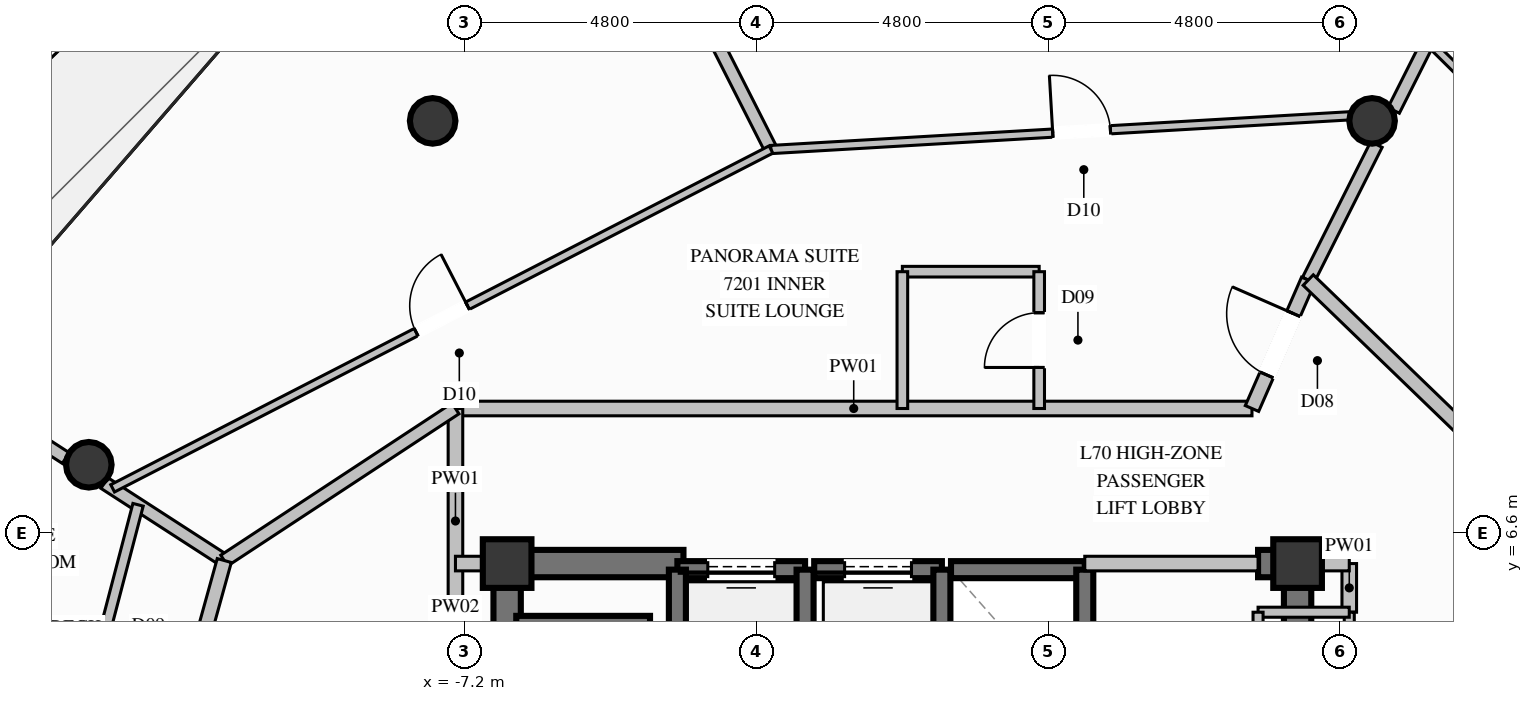
"""IFC4 building model, lengths in metres.
Left out: names, types, materials, properties, quantities, classifications, styles, units other than length and angle.
Written with IfcOpenShell. Run it as: python <this file> out.ifc"""

import sys

from ifc_helpers import new_model, si_unit, direction, frame, frame_2d, origin, origin_2d, place, context, subcontext, project, spatial, rectangle, circle, extrude, element, fill, save


model = new_model("IFC4")
c1 = context("Model", 3, precision=1e-05, world=origin(), true_north=direction((0.0, 1.0)))
c2 = subcontext(c1, "Body", "Model", "MODEL_VIEW")
j1 = project(units=[si_unit("LENGTHUNIT", "METRE"), si_unit("PLANEANGLEUNIT", "RADIAN")], contexts=[c1])
p1 = place(None, origin())
s1 = spatial("IfcSite", under=j1, at=p1, CompositionType="ELEMENT")
p2 = place(p1, origin())
s2 = spatial("IfcBuilding", under=s1, at=p2, CompositionType="ELEMENT")
p3 = place(p2, frame((0.0, 0.0, 270.6)))
s3 = spatial("IfcBuildingStorey", under=s2, at=p3, CompositionType="ELEMENT", Elevation=270.6)
for number, where, z_axis, x_axis in (
    (1, (6.5, 6.1, 0.0), (0.0, 0.0, 1.0), (1.0, 0.0, 0.0)),
    (2, (-6.5, 6.1, 0.0), (0.0, 0.0, 1.0), (1.0, 0.0, 0.0)),
):
    element("IfcColumn", number, at=place(p3, frame(where, z_axis=z_axis, x_axis=x_axis)), inside=s3, PredefinedType="COLUMN", context=c2, shape_type="SweptSolid", body=[
        extrude(rectangle(XDim=0.8, YDim=0.8, at=origin_2d()), origin(), (0.0, 0.0, 1.0), 3.8),
    ])
p4 = place(p3, frame((-6.275, 6.1, 0.0), z_axis=(0.0, 0.0, 1.0), x_axis=(1.0, 0.0, 0.0)))
e3 = element("IfcWall", 3, at=p4, inside=s3, PredefinedType="SHEAR", context=c2, shape_type="SweptSolid", body=[
    extrude(rectangle(XDim=2.675, YDim=0.45, at=frame_2d((1.337, 0.0))), origin(), (0.0, 0.0, 1.0), 3.8),
])
p5 = place(p3, frame((5.85, 6.1, 0.0), z_axis=(0.0, 0.0, 1.0), x_axis=(1.0, 0.0, 0.0)))
e4 = element("IfcWall", 4, at=p5, inside=s3, PredefinedType="SHEAR", context=c2, shape_type="SweptSolid", body=[
    extrude(rectangle(XDim=0.425, YDim=0.45, at=frame_2d((0.212, 0.0))), origin(), (0.0, 0.0, 1.0), 3.8),
])
p6 = place(p3, frame((-6.5, 2.35, 0.0), z_axis=(0.0, 0.0, 1.0), x_axis=(0.0, 1.0, 0.0)))
e5 = element("IfcWall", 5, at=p6, inside=s3, PredefinedType="SHEAR", context=c2, shape_type="SweptSolid", body=[
    extrude(rectangle(XDim=3.975, YDim=0.45, at=frame_2d((1.987, 0.0))), origin(), (0.0, 0.0, 1.0), 3.8),
])
p7 = place(p3, frame((6.5, 3.35, 0.0), z_axis=(0.0, 0.0, 1.0), x_axis=(0.0, 1.0, 0.0)))
e6 = element("IfcWall", 6, at=p7, inside=s3, PredefinedType="SHEAR", context=c2, shape_type="SweptSolid", body=[
    extrude(rectangle(XDim=2.975, YDim=0.45, at=frame_2d((1.487, 0.0))), origin(), (0.0, 0.0, 1.0), 3.8),
])
for number, where, z_axis, x_axis in (
    (7, (7.725, 13.38, 0.0), (0.0, 0.0, 1.0), (1.0, 0.0, 0.0)),
    (8, (-7.725, 13.38, 0.0), (0.0, 0.0, 1.0), (1.0, 0.0, 0.0)),
    (9, (-13.38, 7.725, 0.0), (0.0, 0.0, 1.0), (1.0, 0.0, 0.0)),
):
    element("IfcColumn", number, at=place(p3, frame(where, z_axis=z_axis, x_axis=x_axis)), inside=s3, PredefinedType="COLUMN", context=c2, shape_type="SweptSolid", body=[
        extrude(circle(Radius=0.375, at=origin_2d()), origin(), (0.0, 0.0, 1.0), 3.8),
    ])
p8 = place(p3, frame((-1.6, 6.0, 0.0), z_axis=(0.0, 0.0, 1.0), x_axis=(-1.0, 0.0, 0.0)))
e10 = element("IfcWall", 10, at=p8, inside=s3, PredefinedType="SOLIDWALL", context=c2, shape_type="SweptSolid", body=[
    extrude(rectangle(XDim=2.1, YDim=0.28, at=frame_2d((1.05, 0.0))), origin(), (0.0, 0.0, 1.0), 3.57),
])
p9 = place(p8, frame((0.5, 0.0, 0.0)))
e11 = element("IfcOpeningElement", 11, at=p9, cuts=e10, PredefinedType="OPENING", context=c2, shape_type="SweptSolid", body=[
    extrude(rectangle(XDim=1.1, YDim=2.2, at=frame_2d((0.55, 1.1))), frame((0.0, 0.15, 0.0), z_axis=(0.0, -1.0, 0.0), x_axis=(1.0, 0.0, 0.0)), (0.0, 0.0, 1.0), 0.3),
])
for number, where, z_axis, x_axis in (
    (12, (-3.7, 6.0, 0.0), (0.0, 0.0, 1.0), (0.0, -1.0, 0.0)),
    (13, (-1.6, 3.5, 0.0), (0.0, 0.0, 1.0), (0.0, 1.0, 0.0)),
):
    element("IfcWall", number, at=place(p3, frame(where, z_axis=z_axis, x_axis=x_axis)), inside=s3, PredefinedType="SOLIDWALL", context=c2, shape_type="SweptSolid", body=[
        extrude(rectangle(XDim=2.5, YDim=0.28, at=frame_2d((1.25, 0.0))), origin(), (0.0, 0.0, 1.0), 3.57),
    ])
p10 = place(p3, frame((0.65, 6.0, 0.0), z_axis=(0.0, 0.0, 1.0), x_axis=(-1.0, 0.0, 0.0)))
e14 = element("IfcWall", 14, at=p10, inside=s3, PredefinedType="SOLIDWALL", context=c2, shape_type="SweptSolid", body=[
    extrude(rectangle(XDim=2.1, YDim=0.28, at=frame_2d((1.05, 0.0))), origin(), (0.0, 0.0, 1.0), 3.57),
])
p11 = place(p10, frame((0.5, 0.0, 0.0)))
e15 = element("IfcOpeningElement", 15, at=p11, cuts=e14, PredefinedType="OPENING", context=c2, shape_type="SweptSolid", body=[
    extrude(rectangle(XDim=1.1, YDim=2.2, at=frame_2d((0.55, 1.1))), frame((0.0, 0.15, 0.0), z_axis=(0.0, -1.0, 0.0), x_axis=(1.0, 0.0, 0.0)), (0.0, 0.0, 1.0), 0.3),
])
p12 = place(p3, frame((0.65, 3.5, 0.0), z_axis=(0.0, 0.0, 1.0), x_axis=(0.0, 1.0, 0.0)))
e16 = element("IfcWall", 16, at=p12, inside=s3, PredefinedType="SOLIDWALL", context=c2, shape_type="SweptSolid", body=[
    extrude(rectangle(XDim=2.5, YDim=0.28, at=frame_2d((1.25, 0.0))), origin(), (0.0, 0.0, 1.0), 3.57),
])
p13 = place(p3, frame((3.0, 6.0, 0.0), z_axis=(0.0, 0.0, 1.0), x_axis=(-1.0, 0.0, 0.0)))
e17 = element("IfcWall", 17, at=p13, inside=s3, PredefinedType="SOLIDWALL", context=c2, shape_type="SweptSolid", body=[
    extrude(rectangle(XDim=2.2, YDim=0.28, at=frame_2d((1.1, 0.0))), origin(), (0.0, 0.0, 1.0), 3.57),
])
p14 = place(p3, frame((3.0, 3.5, 0.0), z_axis=(0.0, 0.0, 1.0), x_axis=(0.0, 1.0, 0.0)))
e18 = element("IfcWall", 18, at=p14, inside=s3, PredefinedType="SOLIDWALL", context=c2, shape_type="SweptSolid", body=[
    extrude(rectangle(XDim=2.5, YDim=0.28, at=frame_2d((1.25, 0.0))), origin(), (0.0, 0.0, 1.0), 3.57),
])
p15 = place(p3, frame((-4.15, 5.1, 0.0), z_axis=(0.0, 0.0, 1.0), x_axis=(-1.0, 0.0, 0.0)))
e19 = element("IfcWall", 19, at=p15, inside=s3, PredefinedType="SOLIDWALL", context=c2, shape_type="SweptSolid", body=[
    extrude(rectangle(XDim=2.2, YDim=0.28, at=frame_2d((1.1, 0.0))), origin(), (0.0, 0.0, 1.0), 3.57),
])
p16 = place(p3, frame((-7.35, 8.65, 0.0), z_axis=(0.0, 0.0, 1.0), x_axis=(1.0, 0.0, 0.0)))
e20 = element("IfcWall", 20, at=p16, inside=s3, PredefinedType="PARTITIONING", context=c2, shape_type="SweptSolid", body=[
    extrude(rectangle(XDim=13.1, YDim=0.24, at=frame_2d((6.55, 0.0))), origin(), (0.0, 0.0, 1.0), 3.57),
])
p17 = place(p3, frame((3.0, 6.1, 0.0), z_axis=(0.0, 0.0, 1.0), x_axis=(1.0, 0.0, 0.0)))
e21 = element("IfcWall", 21, at=p17, inside=s3, PredefinedType="PARTITIONING", context=c2, shape_type="SweptSolid", body=[
    extrude(rectangle(XDim=2.85, YDim=0.24, at=frame_2d((1.425, 0.0))), origin(), (0.0, 0.0, 1.0), 2.655),
])
p18 = place(p3, frame((7.35, 5.3, 0.0), z_axis=(0.0, 0.0, 1.0), x_axis=(0.0, 1.0, 0.0)))
e22 = element("IfcWall", 22, at=p18, inside=s3, PredefinedType="PARTITIONING", context=c2, shape_type="SweptSolid", body=[
    extrude(rectangle(XDim=0.8, YDim=0.24, at=frame_2d((0.4, 0.0))), origin(), (0.0, 0.0, 1.0), 2.655),
])
p19 = place(p3, frame((6.5, 6.1, 0.0), z_axis=(0.0, 0.0, 1.0), x_axis=(1.0, 0.0, 0.0)))
e23 = element("IfcWall", 23, at=p19, inside=s3, PredefinedType="PARTITIONING", context=c2, shape_type="SweptSolid", body=[
    extrude(rectangle(XDim=0.85, YDim=0.24, at=frame_2d((0.425, 0.0))), origin(), (0.0, 0.0, 1.0), 3.011),
])
p20 = place(p3, frame((-7.35, 4.95, 0.0), z_axis=(0.0, 0.0, 1.0), x_axis=(0.0, 1.0, 0.0)))
e24 = element("IfcWall", 24, at=p20, inside=s3, PredefinedType="PARTITIONING", context=c2, shape_type="SweptSolid", body=[
    extrude(rectangle(XDim=3.7, YDim=0.24, at=frame_2d((1.85, 0.0))), origin(), (0.0, 0.0, 1.0), 2.655),
])
p21 = place(p3, frame((-7.35, 6.1, 0.0), z_axis=(0.0, 0.0, 1.0), x_axis=(1.0, 0.0, 0.0)))
e25 = element("IfcWall", 25, at=p21, inside=s3, PredefinedType="PARTITIONING", context=c2, shape_type="SweptSolid", body=[
    extrude(rectangle(XDim=0.85, YDim=0.24, at=frame_2d((0.425, 0.0))), origin(), (0.0, 0.0, 1.0), 3.011),
])
p22 = place(p3, frame((7.35, 2.75, 0.0), z_axis=(0.0, 0.0, 1.0), x_axis=(0.0, 1.0, 0.0)))
e26 = element("IfcWall", 26, at=p22, inside=s3, PredefinedType="PARTITIONING", context=c2, shape_type="SweptSolid", body=[
    extrude(rectangle(XDim=2.55, YDim=0.165, at=frame_2d((1.275, 0.0))), origin(), (0.0, 0.0, 1.0), 3.57),
])
p23 = place(p22, frame((0.75, 0.0, 0.0)))
e27 = element("IfcOpeningElement", 27, at=p23, cuts=e26, PredefinedType="OPENING", context=c2, shape_type="SweptSolid", body=[
    extrude(rectangle(XDim=1.05, YDim=2.15, at=frame_2d((0.525, 1.075))), frame((0.0, 0.093, 0.0), z_axis=(0.0, -1.0, 0.0), x_axis=(1.0, 0.0, 0.0)), (0.0, 0.0, 1.0), 0.185),
])
p24 = place(p3, frame((7.35, 5.3, 0.0), z_axis=(0.0, 0.0, 1.0), x_axis=(-1.0, 0.0, 0.0)))
e28 = element("IfcWall", 28, at=p24, inside=s3, PredefinedType="PARTITIONING", context=c2, shape_type="SweptSolid", body=[
    extrude(rectangle(XDim=1.5, YDim=0.165, at=frame_2d((0.75, 0.0))), origin(), (0.0, 0.0, 1.0), 2.655),
])
p25 = place(p3, frame((5.85, 5.3, 0.0), z_axis=(0.0, 0.0, 1.0), x_axis=(0.0, -1.0, 0.0)))
e29 = element("IfcWall", 29, at=p25, inside=s3, PredefinedType="PARTITIONING", context=c2, shape_type="SweptSolid", body=[
    extrude(rectangle(XDim=2.55, YDim=0.165, at=frame_2d((1.275, 0.0))), origin(), (0.0, 0.0, 1.0), 2.655),
])
p26 = place(p3, frame((6.675, 10.762, 0.0), z_axis=(0.0, 0.0, 1.0), x_axis=(0.449481077606, 0.893289852665, 0.0)))
e30 = element("IfcWall", 30, at=p26, inside=s3, PredefinedType="PARTITIONING", context=c2, shape_type="SweptSolid", body=[
    extrude(rectangle(XDim=2.496, YDim=0.21, at=frame_2d((1.248, 0.0))), origin(), (0.0, 0.0, 1.0), 3.011),
])
p27 = place(p3, frame((8.08, 13.553, 0.0), z_axis=(0.0, 0.0, 1.0), x_axis=(0.449494481026, 0.893283108274, 0.0)))
e31 = element("IfcWall", 31, at=p27, inside=s3, PredefinedType="PARTITIONING", context=c2, shape_type="SweptSolid", body=[
    extrude(rectangle(XDim=3.851, YDim=0.21, at=frame_2d((1.925, 0.0))), origin(), (0.0, 0.0, 1.0), 3.57),
])
p28 = place(p3, frame((-11.152, 6.15, 0.0), z_axis=(0.0, 0.0, 1.0), x_axis=(-0.83972632371, 0.54300985375, 0.0)))
e32 = element("IfcWall", 32, at=p28, inside=s3, PredefinedType="PARTITIONING", context=c2, shape_type="SweptSolid", body=[
    extrude(rectangle(XDim=2.348, YDim=0.21, at=frame_2d((1.174, 0.0))), origin(), (0.0, 0.0, 1.0), 3.011),
])
p29 = place(p3, frame((-13.759, 7.835, 0.0), z_axis=(0.0, 0.0, 1.0), x_axis=(-0.83972828355, 0.543006822982, 0.0)))
e33 = element("IfcWall", 33, at=p29, inside=s3, PredefinedType="PARTITIONING", context=c2, shape_type="SweptSolid", body=[
    extrude(rectangle(XDim=1.864, YDim=0.21, at=frame_2d((0.932, 0.0))), origin(), (0.0, 0.0, 1.0), 3.57),
])
for number, where, z_axis, x_axis in (
    (34, (0.0, 10.9, 0.0), (0.0, 0.0, 1.0), (1.0, 0.0, 0.0)),
    (35, (0.0, 10.9, 0.0), (0.0, 0.0, 1.0), (0.0, -1.0, 0.0)),
):
    element("IfcWall", number, at=place(p3, frame(where, z_axis=z_axis, x_axis=x_axis)), inside=s3, PredefinedType="PLUMBINGWALL", context=c2, shape_type="SweptSolid", body=[
        extrude(rectangle(XDim=2.25, YDim=0.175, at=frame_2d((1.125, 0.0))), origin(), (0.0, 0.0, 1.0), 3.57),
    ])
p30 = place(p3, frame((2.25, 8.65, 0.0), z_axis=(0.0, 0.0, 1.0), x_axis=(0.0, 1.0, 0.0)))
e36 = element("IfcWall", 36, at=p30, inside=s3, PredefinedType="PLUMBINGWALL", context=c2, shape_type="SweptSolid", body=[
    extrude(rectangle(XDim=2.25, YDim=0.175, at=frame_2d((1.125, 0.0))), origin(), (0.0, 0.0, 1.0), 3.57),
])
p31 = place(p30, frame((0.675, 0.0, 0.0)))
e37 = element("IfcOpeningElement", 37, at=p31, cuts=e36, PredefinedType="OPENING", context=c2, shape_type="SweptSolid", body=[
    extrude(rectangle(XDim=0.9, YDim=2.1, at=frame_2d((0.45, 1.05))), frame((0.0, 0.098, 0.0), z_axis=(0.0, -1.0, 0.0), x_axis=(1.0, 0.0, 0.0)), (0.0, 0.0, 1.0), 0.195),
])
p32 = place(p3, frame((-11.152, 6.15, 0.0), z_axis=(0.0, 0.0, 1.0), x_axis=(0.835549960432, 0.549414473437, 0.0)))
e38 = element("IfcWall", 38, at=p32, inside=s3, PredefinedType="PARTITIONING", context=c2, shape_type="SweptSolid", body=[
    extrude(rectangle(XDim=4.55, YDim=0.21, at=frame_2d((2.275, 0.0))), origin(), (0.0, 0.0, 1.0), 3.57),
])
p33 = place(p3, frame((5.75, 8.65, 0.0), z_axis=(0.0, 0.0, 1.0), x_axis=(0.401190953907, 0.915994442398, 0.0)))
e39 = element("IfcWall", 39, at=p33, inside=s3, PredefinedType="PARTITIONING", context=c2, shape_type="SweptSolid", body=[
    extrude(rectangle(XDim=2.306, YDim=0.24, at=frame_2d((1.153, 0.0))), origin(), (0.0, 0.0, 1.0), 3.011),
])
p34 = place(p33, frame((0.603, 0.0, 0.0)))
e40 = element("IfcOpeningElement", 40, at=p34, cuts=e39, PredefinedType="OPENING", context=c2, shape_type="SweptSolid", body=[
    extrude(rectangle(XDim=1.1, YDim=2.3, at=frame_2d((0.55, 1.15))), frame((0.0, 0.13, 0.0), z_axis=(0.0, -1.0, 0.0), x_axis=(1.0, 0.0, 0.0)), (0.0, 0.0, 1.0), 0.26),
])
p35 = place(p3, frame((-2.161, 12.909, 0.0), z_axis=(0.0, 0.0, 1.0), x_axis=(-0.452554812293, 0.891736587715, 0.0)))
e41 = element("IfcWall", 41, at=p35, inside=s3, PredefinedType="PARTITIONING", context=c2, shape_type="SweptSolid", body=[
    extrude(rectangle(XDim=6.079, YDim=0.21, at=frame_2d((3.04, 0.0))), origin(), (0.0, 0.0, 1.0), 3.57),
])
p36 = place(p3, frame((-2.161, 12.909, 0.0), z_axis=(0.0, 0.0, 1.0), x_axis=(0.998308345871, 0.05814160785, 0.0)))
e42 = element("IfcWall", 42, at=p36, inside=s3, PredefinedType="PARTITIONING", context=c2, shape_type="SweptSolid", body=[
    extrude(rectangle(XDim=10.233, YDim=0.135, at=frame_2d((5.117, 0.0))), origin(), (0.0, 0.0, 1.0), 3.138),
])
p37 = place(p36, frame((4.642, 0.0, 0.0)))
e43 = element("IfcOpeningElement", 43, at=p37, cuts=e42, PredefinedType="OPENING", context=c2, shape_type="SweptSolid", body=[
    extrude(rectangle(XDim=0.95, YDim=2.1, at=frame_2d((0.475, 1.05))), frame((0.0, 0.078, 0.0), z_axis=(0.0, -1.0, 0.0), x_axis=(1.0, 0.0, 0.0)), (0.0, 0.0, 1.0), 0.155),
])
p38 = place(p3, frame((-12.988, 7.337, 0.0), z_axis=(0.0, 0.0, 1.0), x_axis=(0.889161723705, 0.457593082441, 0.0)))
e44 = element("IfcWall", 44, at=p38, inside=s3, PredefinedType="PARTITIONING", context=c2, shape_type="SweptSolid", body=[
    extrude(rectangle(XDim=12.177, YDim=0.135, at=frame_2d((6.088, 0.0))), origin(), (0.0, 0.0, 1.0), 3.138),
])
p39 = place(p38, frame((5.613, 0.0, 0.0)))
e45 = element("IfcOpeningElement", 45, at=p39, cuts=e44, PredefinedType="OPENING", context=c2, shape_type="SweptSolid", body=[
    extrude(rectangle(XDim=0.95, YDim=2.1, at=frame_2d((0.475, 1.05))), frame((0.0, 0.078, 0.0), z_axis=(0.0, -1.0, 0.0), x_axis=(1.0, 0.0, 0.0)), (0.0, 0.0, 1.0), 0.155),
])
p40 = place(p3, frame((-11.152, 6.15, 0.0), z_axis=(0.0, 0.0, 1.0), x_axis=(-0.267267816759, -0.963622288101, 0.0)))
e46 = element("IfcWall", 46, at=p40, inside=s3, PredefinedType="PARTITIONING", context=c2, shape_type="SweptSolid", body=[
    extrude(rectangle(XDim=2.746, YDim=0.24, at=frame_2d((1.373, 0.0))), origin(), (0.0, 0.0, 1.0), 3.57),
])
p41 = place(p3, frame((-12.57, 7.067, 0.0), z_axis=(0.0, 0.0, 1.0), x_axis=(-0.25291700501, -0.967487978518, 0.0)))
e47 = element("IfcWall", 47, at=p41, inside=s3, PredefinedType="PLUMBINGWALL", context=c2, shape_type="SweptSolid", body=[
    extrude(rectangle(XDim=3.111, YDim=0.175, at=frame_2d((1.556, 0.0))), origin(), (0.0, 0.0, 1.0), 3.57),
])
p42 = place(p3, frame((11.452, 6.15, 0.0), z_axis=(0.0, 0.0, 1.0), x_axis=(-0.719407162497, 0.694588608133, 0.0)))
e48 = element("IfcWall", 48, at=p42, inside=s3, PredefinedType="PARTITIONING", context=c2, shape_type="SweptSolid", body=[
    extrude(rectangle(XDim=6.64, YDim=0.24, at=frame_2d((3.32, 0.0))), origin(), (0.0, 0.0, 1.0), 3.57),
])
p43 = place(p3, frame((14.948, 8.46, 0.0), z_axis=(0.0, 0.0, 1.0), x_axis=(-0.710996539207, 0.703195507121, 0.0)))
e49 = element("IfcWall", 49, at=p43, inside=s3, PredefinedType="PARTITIONING", context=c2, shape_type="SweptSolid", body=[
    extrude(rectangle(XDim=8.857, YDim=0.135, at=frame_2d((4.428, 0.0))), origin(), (0.0, 0.0, 1.0), 3.57),
])
p44 = place(p43, frame((3.953, 0.0, 0.0)))
e50 = element("IfcOpeningElement", 50, at=p44, cuts=e49, PredefinedType="OPENING", context=c2, shape_type="SweptSolid", body=[
    extrude(rectangle(XDim=0.95, YDim=2.1, at=frame_2d((0.475, 1.05))), frame((0.0, 0.078, 0.0), z_axis=(0.0, -1.0, 0.0), x_axis=(1.0, 0.0, 0.0)), (0.0, 0.0, 1.0), 0.155),
])
p45 = place(p9, origin())
e51 = element("IfcDoor", 51, at=p45, inside=s3, OperationType="SLIDING_TO_LEFT", PredefinedType="DOOR", context=c2, shape_type="SweptSolid", body=[
    extrude(rectangle(XDim=1.1, YDim=2.2, at=frame_2d((0.55, 1.1))), frame((0.0, 0.025, 0.0), z_axis=(0.0, -1.0, 0.0), x_axis=(1.0, 0.0, 0.0)), (0.0, 0.0, 1.0), 0.05),
])
fill(e11, e51)
p46 = place(p11, origin())
e52 = element("IfcDoor", 52, at=p46, inside=s3, OperationType="SLIDING_TO_LEFT", PredefinedType="DOOR", context=c2, shape_type="SweptSolid", body=[
    extrude(rectangle(XDim=1.1, YDim=2.2, at=frame_2d((0.55, 1.1))), frame((0.0, 0.025, 0.0), z_axis=(0.0, -1.0, 0.0), x_axis=(1.0, 0.0, 0.0)), (0.0, 0.0, 1.0), 0.05),
])
fill(e15, e52)
p47 = place(p31, origin())
e53 = element("IfcDoor", 53, at=p47, inside=s3, OperationType="SINGLE_SWING_LEFT", PredefinedType="DOOR", context=c2, shape_type="SweptSolid", body=[
    extrude(rectangle(XDim=0.9, YDim=2.1, at=frame_2d((0.45, 1.05))), frame((0.0, 0.025, 0.0), z_axis=(0.0, -1.0, 0.0), x_axis=(1.0, 0.0, 0.0)), (0.0, 0.0, 1.0), 0.05),
])
fill(e37, e53)
p48 = place(p34, origin())
e54 = element("IfcDoor", 54, at=p48, inside=s3, OperationType="SINGLE_SWING_RIGHT", PredefinedType="DOOR", context=c2, shape_type="SweptSolid", body=[
    extrude(rectangle(XDim=1.1, YDim=2.3, at=frame_2d((0.55, 1.15))), frame((0.0, 0.025, 0.0), z_axis=(0.0, -1.0, 0.0), x_axis=(1.0, 0.0, 0.0)), (0.0, 0.0, 1.0), 0.05),
])
fill(e40, e54)
p49 = place(p37, origin())
e55 = element("IfcDoor", 55, at=p49, inside=s3, OperationType="SINGLE_SWING_LEFT", PredefinedType="DOOR", context=c2, shape_type="SweptSolid", body=[
    extrude(rectangle(XDim=0.95, YDim=2.1, at=frame_2d((0.475, 1.05))), frame((0.0, 0.025, 0.0), z_axis=(0.0, -1.0, 0.0), x_axis=(1.0, 0.0, 0.0)), (0.0, 0.0, 1.0), 0.05),
])
fill(e43, e55)
p50 = place(p39, origin())
e56 = element("IfcDoor", 56, at=p50, inside=s3, OperationType="SINGLE_SWING_RIGHT", PredefinedType="DOOR", context=c2, shape_type="SweptSolid", body=[
    extrude(rectangle(XDim=0.95, YDim=2.1, at=frame_2d((0.475, 1.05))), frame((0.0, 0.025, 0.0), z_axis=(0.0, -1.0, 0.0), x_axis=(1.0, 0.0, 0.0)), (0.0, 0.0, 1.0), 0.05),
])
fill(e45, e56)
save(model, sys.argv[1])
